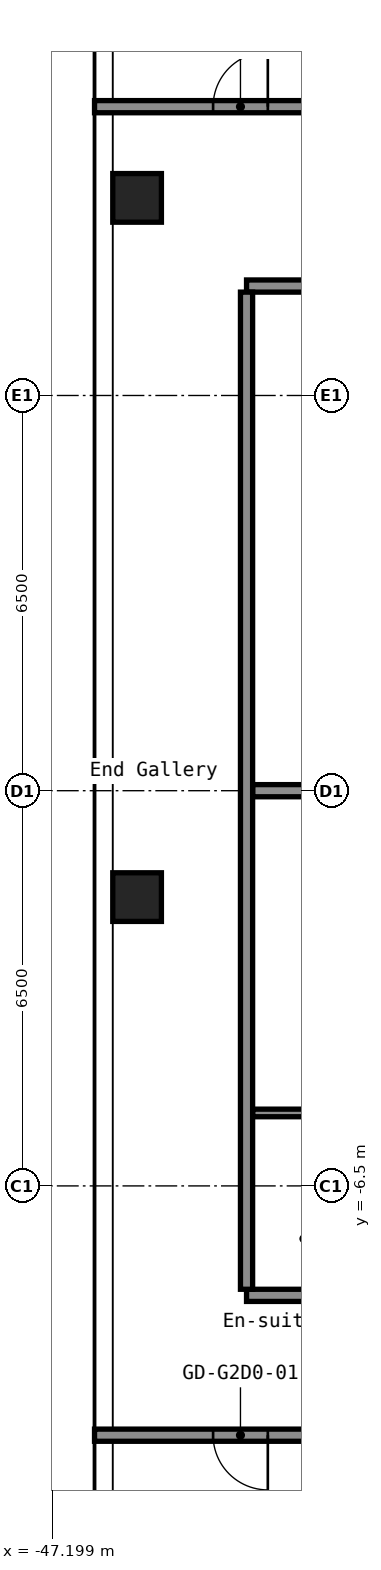
"""IFC4 building model, lengths in metres.
Left out: names, types, materials, properties, quantities, classifications, styles, units other than length and angle.
Written with IfcOpenShell. Run it as: python <this file> out.ifc"""

import sys

from ifc_helpers import new_model, si_unit, direction, frame, frame_2d, origin, origin_2d, place, context, subcontext, project, spatial, rectangle, hollow_rectangle, extrude, element, fill, save


model = new_model("IFC4")
c1 = context("Model", 3, precision=1e-05, world=origin(), true_north=direction((0.0, 1.0)))
c2 = subcontext(c1, "Body", "Model", "MODEL_VIEW")
j1 = project(units=[si_unit("LENGTHUNIT", "METRE"), si_unit("PLANEANGLEUNIT", "RADIAN")], contexts=[c1])
p1 = place(None, origin())
s1 = spatial("IfcSite", under=j1, at=p1, CompositionType="ELEMENT")
p2 = place(p1, origin())
s2 = spatial("IfcBuilding", under=s1, at=p2, CompositionType="ELEMENT")
p3 = place(p2, frame((0.0, 0.0, 85.0)))
s3 = spatial("IfcBuildingStorey", under=s2, at=p3, CompositionType="ELEMENT", Elevation=85.0)
for number, where, z_axis, x_axis in (
    (1, (-45.8, -1.75, 0.0), (0.0, 0.0, 1.0), (1.0, 0.0, 0.0)),
    (2, (-45.8, 9.75, 0.0), (0.0, 0.0, 1.0), (1.0, 0.0, 0.0)),
):
    element("IfcColumn", number, at=place(p3, frame(where, z_axis=z_axis, x_axis=x_axis)), inside=s3, PredefinedType="COLUMN", context=c2, shape_type="SweptSolid", body=[
        extrude(hollow_rectangle(XDim=0.8, YDim=0.8, WallThickness=0.032, at=origin_2d()), origin(), (0.0, 0.0, 1.0), 2.8),
    ])
p4 = place(p3, frame((-46.5, -10.6, 0.0), z_axis=(0.0, 0.0, 1.0), x_axis=(1.0, 0.0, 0.0)))
e3 = element("IfcWall", 3, at=p4, inside=s3, PredefinedType="PARTITIONING", context=c2, shape_type="SweptSolid", body=[
    extrude(rectangle(XDim=29.7, YDim=0.2, at=frame_2d((14.85, 0.0))), origin(), (0.0, 0.0, 1.0), 2.8),
])
p5 = place(p4, frame((1.95, 0.0, 0.0)))
e4 = element("IfcOpeningElement", 4, at=p5, cuts=e3, PredefinedType="OPENING", context=c2, shape_type="SweptSolid", body=[
    extrude(rectangle(XDim=0.9, YDim=2.1, at=frame_2d((0.45, 1.05))), frame((0.0, 0.11, 0.0), z_axis=(0.0, -1.0, 0.0), x_axis=(1.0, 0.0, 0.0)), (0.0, 0.0, 1.0), 0.22),
])
p6 = place(p4, frame((5.98, 0.0, 0.0)))
e5 = element("IfcOpeningElement", 5, at=p6, cuts=e3, PredefinedType="OPENING", context=c2, shape_type="SweptSolid", body=[
    extrude(rectangle(XDim=0.9, YDim=2.1, at=frame_2d((0.45, 1.05))), frame((0.0, 0.11, 0.0), z_axis=(0.0, -1.0, 0.0), x_axis=(1.0, 0.0, 0.0)), (0.0, 0.0, 1.0), 0.22),
])
p7 = place(p4, frame((10.18, 0.0, 0.0)))
e6 = element("IfcOpeningElement", 6, at=p7, cuts=e3, PredefinedType="OPENING", context=c2, shape_type="SweptSolid", body=[
    extrude(rectangle(XDim=0.9, YDim=2.1, at=frame_2d((0.45, 1.05))), frame((0.0, 0.11, 0.0), z_axis=(0.0, -1.0, 0.0), x_axis=(1.0, 0.0, 0.0)), (0.0, 0.0, 1.0), 0.22),
])
p8 = place(p4, frame((14.885, 0.0, 0.0)))
e7 = element("IfcOpeningElement", 7, at=p8, cuts=e3, PredefinedType="OPENING", context=c2, shape_type="SweptSolid", body=[
    extrude(rectangle(XDim=0.9, YDim=2.1, at=frame_2d((0.45, 1.05))), frame((0.0, 0.11, 0.0), z_axis=(0.0, -1.0, 0.0), x_axis=(1.0, 0.0, 0.0)), (0.0, 0.0, 1.0), 0.22),
])
p9 = place(p4, frame((19.085, 0.0, 0.0)))
e8 = element("IfcOpeningElement", 8, at=p9, cuts=e3, PredefinedType="OPENING", context=c2, shape_type="SweptSolid", body=[
    extrude(rectangle(XDim=0.9, YDim=2.1, at=frame_2d((0.45, 1.05))), frame((0.0, 0.11, 0.0), z_axis=(0.0, -1.0, 0.0), x_axis=(1.0, 0.0, 0.0)), (0.0, 0.0, 1.0), 0.22),
])
p10 = place(p4, frame((22.68, 0.0, 0.0)))
e9 = element("IfcOpeningElement", 9, at=p10, cuts=e3, PredefinedType="OPENING", context=c2, shape_type="SweptSolid", body=[
    extrude(rectangle(XDim=0.9, YDim=2.1, at=frame_2d((0.45, 1.05))), frame((0.0, 0.11, 0.0), z_axis=(0.0, -1.0, 0.0), x_axis=(1.0, 0.0, 0.0)), (0.0, 0.0, 1.0), 0.22),
])
p11 = place(p4, frame((26.88, 0.0, 0.0)))
e10 = element("IfcOpeningElement", 10, at=p11, cuts=e3, PredefinedType="OPENING", context=c2, shape_type="SweptSolid", body=[
    extrude(rectangle(XDim=0.9, YDim=2.1, at=frame_2d((0.45, 1.05))), frame((0.0, 0.11, 0.0), z_axis=(0.0, -1.0, 0.0), x_axis=(1.0, 0.0, 0.0)), (0.0, 0.0, 1.0), 0.22),
])
p12 = place(p3, frame((-44.0, -8.3, 0.0), z_axis=(0.0, 0.0, 1.0), x_axis=(1.0, 0.0, 0.0)))
e11 = element("IfcWall", 11, at=p12, inside=s3, PredefinedType="PARTITIONING", context=c2, shape_type="SweptSolid", body=[
    extrude(rectangle(XDim=10.4, YDim=0.2, at=frame_2d((5.2, 0.0))), origin(), (0.0, 0.0, 1.0), 2.8),
])
p13 = place(p12, frame((3.35, 0.0, 0.0)))
e12 = element("IfcOpeningElement", 12, at=p13, cuts=e11, PredefinedType="OPENING", context=c2, shape_type="SweptSolid", body=[
    extrude(rectangle(XDim=1.0, YDim=2.1, at=frame_2d((0.5, 1.05))), frame((0.0, 0.11, 0.0), z_axis=(0.0, -1.0, 0.0), x_axis=(1.0, 0.0, 0.0)), (0.0, 0.0, 1.0), 0.22),
])
p14 = place(p12, frame((6.05, 0.0, 0.0)))
e13 = element("IfcOpeningElement", 13, at=p14, cuts=e11, PredefinedType="OPENING", context=c2, shape_type="SweptSolid", body=[
    extrude(rectangle(XDim=1.0, YDim=2.1, at=frame_2d((0.5, 1.05))), frame((0.0, 0.11, 0.0), z_axis=(0.0, -1.0, 0.0), x_axis=(1.0, 0.0, 0.0)), (0.0, 0.0, 1.0), 0.22),
])
p15 = place(p3, frame((-43.9, -5.3, 0.0), z_axis=(0.0, 0.0, 1.0), x_axis=(1.0, 0.0, 0.0)))
e14 = element("IfcWall", 14, at=p15, inside=s3, PredefinedType="PARTITIONING", context=c2, shape_type="SweptSolid", body=[
    extrude(rectangle(XDim=2.337, YDim=0.125, at=frame_2d((1.169, 0.0))), origin(), (0.0, 0.0, 1.0), 2.8),
])
p16 = place(p3, frame((-43.9, 0.0, 0.0), z_axis=(0.0, 0.0, 1.0), x_axis=(1.0, 0.0, 0.0)))
e15 = element("IfcWall", 15, at=p16, inside=s3, PredefinedType="PARTITIONING", context=c2, shape_type="SweptSolid", body=[
    extrude(rectangle(XDim=10.3, YDim=0.2, at=frame_2d((5.15, 0.0))), origin(), (0.0, 0.0, 1.0), 2.8),
])
p17 = place(p3, frame((-44.0, 8.3, 0.0), z_axis=(0.0, 0.0, 1.0), x_axis=(1.0, 0.0, 0.0)))
e16 = element("IfcWall", 16, at=p17, inside=s3, PredefinedType="PARTITIONING", context=c2, shape_type="SweptSolid", body=[
    extrude(rectangle(XDim=10.4, YDim=0.2, at=frame_2d((5.2, 0.0))), origin(), (0.0, 0.0, 1.0), 2.8),
])
p18 = place(p17, frame((3.05, 0.0, 0.0)))
e17 = element("IfcOpeningElement", 17, at=p18, cuts=e16, PredefinedType="OPENING", context=c2, shape_type="SweptSolid", body=[
    extrude(rectangle(XDim=1.0, YDim=2.1, at=frame_2d((0.5, 1.05))), frame((0.0, 0.11, 0.0), z_axis=(0.0, -1.0, 0.0), x_axis=(1.0, 0.0, 0.0)), (0.0, 0.0, 1.0), 0.22),
])
p19 = place(p3, frame((-46.5, 11.25, 0.0), z_axis=(0.0, 0.0, 1.0), x_axis=(1.0, 0.0, 0.0)))
e18 = element("IfcWall", 18, at=p19, inside=s3, PredefinedType="PARTITIONING", context=c2, shape_type="SweptSolid", body=[
    extrude(rectangle(XDim=29.7, YDim=0.2, at=frame_2d((14.85, 0.0))), origin(), (0.0, 0.0, 1.0), 2.8),
])
p20 = place(p19, frame((1.95, 0.0, 0.0)))
e19 = element("IfcOpeningElement", 19, at=p20, cuts=e18, PredefinedType="OPENING", context=c2, shape_type="SweptSolid", body=[
    extrude(rectangle(XDim=0.9, YDim=2.1, at=frame_2d((0.45, 1.05))), frame((0.0, 0.11, 0.0), z_axis=(0.0, -1.0, 0.0), x_axis=(1.0, 0.0, 0.0)), (0.0, 0.0, 1.0), 0.22),
])
p21 = place(p19, frame((6.57, 0.0, 0.0)))
e20 = element("IfcOpeningElement", 20, at=p21, cuts=e18, PredefinedType="OPENING", context=c2, shape_type="SweptSolid", body=[
    extrude(rectangle(XDim=0.9, YDim=2.1, at=frame_2d((0.45, 1.05))), frame((0.0, 0.11, 0.0), z_axis=(0.0, -1.0, 0.0), x_axis=(1.0, 0.0, 0.0)), (0.0, 0.0, 1.0), 0.22),
])
p22 = place(p19, frame((10.77, 0.0, 0.0)))
e21 = element("IfcOpeningElement", 21, at=p22, cuts=e18, PredefinedType="OPENING", context=c2, shape_type="SweptSolid", body=[
    extrude(rectangle(XDim=0.9, YDim=2.1, at=frame_2d((0.45, 1.05))), frame((0.0, 0.11, 0.0), z_axis=(0.0, -1.0, 0.0), x_axis=(1.0, 0.0, 0.0)), (0.0, 0.0, 1.0), 0.22),
])
p23 = place(p19, frame((15.055, 0.0, 0.0)))
e22 = element("IfcOpeningElement", 22, at=p23, cuts=e18, PredefinedType="OPENING", context=c2, shape_type="SweptSolid", body=[
    extrude(rectangle(XDim=0.9, YDim=2.1, at=frame_2d((0.45, 1.05))), frame((0.0, 0.11, 0.0), z_axis=(0.0, -1.0, 0.0), x_axis=(1.0, 0.0, 0.0)), (0.0, 0.0, 1.0), 0.22),
])
p24 = place(p19, frame((19.255, 0.0, 0.0)))
e23 = element("IfcOpeningElement", 23, at=p24, cuts=e18, PredefinedType="OPENING", context=c2, shape_type="SweptSolid", body=[
    extrude(rectangle(XDim=0.9, YDim=2.1, at=frame_2d((0.45, 1.05))), frame((0.0, 0.11, 0.0), z_axis=(0.0, -1.0, 0.0), x_axis=(1.0, 0.0, 0.0)), (0.0, 0.0, 1.0), 0.22),
])
p25 = place(p19, frame((22.7, 0.0, 0.0)))
e24 = element("IfcOpeningElement", 24, at=p25, cuts=e18, PredefinedType="OPENING", context=c2, shape_type="SweptSolid", body=[
    extrude(rectangle(XDim=0.9, YDim=2.1, at=frame_2d((0.45, 1.05))), frame((0.0, 0.11, 0.0), z_axis=(0.0, -1.0, 0.0), x_axis=(1.0, 0.0, 0.0)), (0.0, 0.0, 1.0), 0.22),
])
p26 = place(p19, frame((26.9, 0.0, 0.0)))
e25 = element("IfcOpeningElement", 25, at=p26, cuts=e18, PredefinedType="OPENING", context=c2, shape_type="SweptSolid", body=[
    extrude(rectangle(XDim=0.9, YDim=2.1, at=frame_2d((0.45, 1.05))), frame((0.0, 0.11, 0.0), z_axis=(0.0, -1.0, 0.0), x_axis=(1.0, 0.0, 0.0)), (0.0, 0.0, 1.0), 0.22),
])
p27 = place(p3, frame((-44.0, -8.2, 0.0), z_axis=(0.0, 0.0, 1.0), x_axis=(0.0, 1.0, 0.0)))
e26 = element("IfcWall", 26, at=p27, inside=s3, PredefinedType="PARTITIONING", context=c2, shape_type="SweptSolid", body=[
    extrude(rectangle(XDim=16.4, YDim=0.2, at=frame_2d((8.2, 0.0))), origin(), (0.0, 0.0, 1.0), 2.8),
])
p28 = place(p5, origin())
e27 = element("IfcDoor", 27, at=p28, inside=s3, OperationType="SINGLE_SWING_RIGHT", PredefinedType="DOOR", context=c2, shape_type="SweptSolid", body=[
    extrude(rectangle(XDim=0.9, YDim=2.1, at=frame_2d((0.45, 1.05))), frame((0.0, 0.025, 0.0), z_axis=(0.0, -1.0, 0.0), x_axis=(1.0, 0.0, 0.0)), (0.0, 0.0, 1.0), 0.05),
])
fill(e4, e27)
p29 = place(p20, origin())
e28 = element("IfcDoor", 28, at=p29, inside=s3, OperationType="SINGLE_SWING_LEFT", PredefinedType="DOOR", context=c2, shape_type="SweptSolid", body=[
    extrude(rectangle(XDim=0.9, YDim=2.1, at=frame_2d((0.45, 1.05))), frame((0.0, 0.025, 0.0), z_axis=(0.0, -1.0, 0.0), x_axis=(1.0, 0.0, 0.0)), (0.0, 0.0, 1.0), 0.05),
])
fill(e19, e28)
save(model, sys.argv[1])
